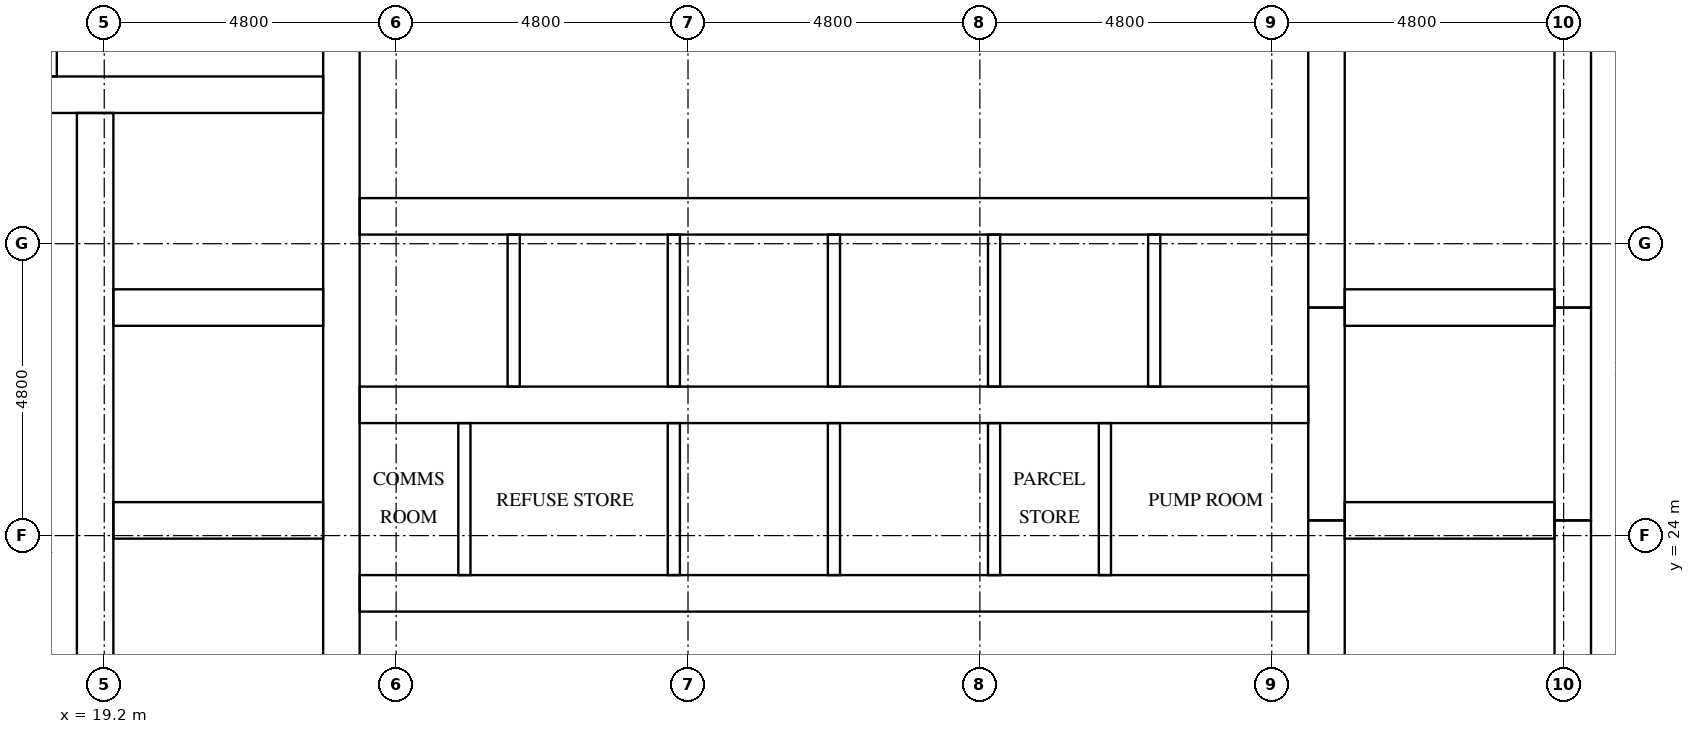
"""IFC4 building model, lengths in metres.
Left out: names, types, materials, properties, quantities, classifications, styles, units other than length and angle.
Written with IfcOpenShell. Run it as: python <this file> out.ifc"""

import sys

from ifc_helpers import new_model, si_unit, direction, frame, frame_2d, origin, place, context, subcontext, project, spatial, rectangle, extrude, element, fill, save


model = new_model("IFC4")
c1 = context("Model", 3, precision=1e-05, world=origin(), true_north=direction((0.0, 1.0)))
c2 = subcontext(c1, "Body", "Model", "MODEL_VIEW")
j1 = project(units=[si_unit("LENGTHUNIT", "METRE"), si_unit("PLANEANGLEUNIT", "RADIAN")], contexts=[c1])
p1 = place(None, origin())
s1 = spatial("IfcSite", under=j1, at=p1, CompositionType="ELEMENT")
p2 = place(p1, origin())
s2 = spatial("IfcBuilding", under=s1, at=p2, CompositionType="ELEMENT")
p3 = place(p2, frame((0.0, 0.0, 156.0)))
s3 = spatial("IfcBuildingStorey", under=s2, at=p3, CompositionType="ELEMENT", Elevation=156.0)
p4 = place(p3, frame((19.05, 15.8, 0.0), z_axis=(0.0, 0.0, 1.0), x_axis=(0.0, 1.0, 0.0)))
e1 = element("IfcWall", 1, at=p4, inside=s3, PredefinedType="SHEAR", context=c2, shape_type="SweptSolid", body=[
    extrude(rectangle(XDim=15.15, YDim=0.6, at=frame_2d((7.575, 0.0))), origin(), (0.0, 0.0, 1.0), 3.2),
])
p5 = place(p4, frame((9.65, 0.0, 0.0)))
e2 = element("IfcOpeningElement", 2, at=p5, cuts=e1, PredefinedType="OPENING", context=c2, shape_type="SweptSolid", body=[
    extrude(rectangle(XDim=1.1, YDim=2.1, at=frame_2d((0.55, 1.05))), frame((0.0, 0.31, 0.0), z_axis=(0.0, -1.0, 0.0), x_axis=(1.0, 0.0, 0.0)), (0.0, 0.0, 1.0), 0.62),
])
p6 = place(p4, frame((13.15, 0.0, 0.0)))
e3 = element("IfcOpeningElement", 3, at=p6, cuts=e1, PredefinedType="OPENING", context=c2, shape_type="SweptSolid", body=[
    extrude(rectangle(XDim=1.1, YDim=2.1, at=frame_2d((0.55, 1.05))), frame((0.0, 0.31, 0.0), z_axis=(0.0, -1.0, 0.0), x_axis=(1.0, 0.0, 0.0)), (0.0, 0.0, 1.0), 0.62),
])
p7 = place(p4, frame((0.4, 0.0, 0.0)))
e4 = element("IfcOpeningElement", 4, at=p7, cuts=e1, PredefinedType="OPENING", context=c2, shape_type="SweptSolid", body=[
    extrude(rectangle(XDim=1.2, YDim=2.1, at=frame_2d((0.6, 1.05))), frame((0.0, 0.31, 0.0), z_axis=(0.0, -1.0, 0.0), x_axis=(1.0, 0.0, 0.0)), (0.0, 0.0, 1.0), 0.62),
])
p8 = place(p3, frame((23.1, 15.8, 0.0), z_axis=(0.0, 0.0, 1.0), x_axis=(0.0, 1.0, 0.0)))
e5 = element("IfcWall", 5, at=p8, inside=s3, PredefinedType="SHEAR", context=c2, shape_type="SweptSolid", body=[
    extrude(rectangle(XDim=21.2, YDim=0.6, at=frame_2d((10.6, 0.0))), origin(), (0.0, 0.0, 1.0), 3.2),
])
p9 = place(p3, frame((39.3, 15.8, 0.0), z_axis=(0.0, 0.0, 1.0), x_axis=(0.0, 1.0, 0.0)))
e6 = element("IfcWall", 6, at=p9, inside=s3, PredefinedType="SHEAR", context=c2, shape_type="SweptSolid", body=[
    extrude(rectangle(XDim=8.45, YDim=0.6, at=frame_2d((4.225, 0.0))), origin(), (0.0, 0.0, 1.0), 3.2),
])
p10 = place(p3, frame((39.3, 24.25, 0.0), z_axis=(0.0, 0.0, 1.0), x_axis=(0.0, 1.0, 0.0)))
e7 = element("IfcWall", 7, at=p10, inside=s3, PredefinedType="SHEAR", context=c2, shape_type="SweptSolid", body=[
    extrude(rectangle(XDim=3.5, YDim=0.6, at=frame_2d((1.75, 0.0))), origin(), (0.0, 0.0, 1.0), 3.2),
])
p11 = place(p3, frame((39.3, 27.75, 0.0), z_axis=(0.0, 0.0, 1.0), x_axis=(0.0, 1.0, 0.0)))
e8 = element("IfcWall", 8, at=p11, inside=s3, PredefinedType="SHEAR", context=c2, shape_type="SweptSolid", body=[
    extrude(rectangle(XDim=9.25, YDim=0.6, at=frame_2d((4.625, 0.0))), origin(), (0.0, 0.0, 1.0), 3.2),
])
p12 = place(p3, frame((43.35, 15.8, 0.0), z_axis=(0.0, 0.0, 1.0), x_axis=(0.0, 1.0, 0.0)))
e9 = element("IfcWall", 9, at=p12, inside=s3, PredefinedType="SHEAR", context=c2, shape_type="SweptSolid", body=[
    extrude(rectangle(XDim=8.45, YDim=0.6, at=frame_2d((4.225, 0.0))), origin(), (0.0, 0.0, 1.0), 3.2),
])
p13 = place(p12, frame((0.4, 0.0, 0.0)))
e10 = element("IfcOpeningElement", 10, at=p13, cuts=e9, PredefinedType="OPENING", context=c2, shape_type="SweptSolid", body=[
    extrude(rectangle(XDim=1.2, YDim=2.1, at=frame_2d((0.6, 1.05))), frame((0.0, 0.31, 0.0), z_axis=(0.0, -1.0, 0.0), x_axis=(1.0, 0.0, 0.0)), (0.0, 0.0, 1.0), 0.62),
])
p14 = place(p3, frame((43.35, 24.25, 0.0), z_axis=(0.0, 0.0, 1.0), x_axis=(0.0, 1.0, 0.0)))
e11 = element("IfcWall", 11, at=p14, inside=s3, PredefinedType="SHEAR", context=c2, shape_type="SweptSolid", body=[
    extrude(rectangle(XDim=3.5, YDim=0.6, at=frame_2d((1.75, 0.0))), origin(), (0.0, 0.0, 1.0), 3.2),
])
p15 = place(p14, frame((1.2, 0.0, 0.0)))
e12 = element("IfcOpeningElement", 12, at=p15, cuts=e11, PredefinedType="OPENING", context=c2, shape_type="SweptSolid", body=[
    extrude(rectangle(XDim=1.1, YDim=2.1, at=frame_2d((0.55, 1.05))), frame((0.0, 0.31, 0.0), z_axis=(0.0, -1.0, 0.0), x_axis=(1.0, 0.0, 0.0)), (0.0, 0.0, 1.0), 0.62),
])
p16 = place(p3, frame((43.35, 27.75, 0.0), z_axis=(0.0, 0.0, 1.0), x_axis=(0.0, 1.0, 0.0)))
e13 = element("IfcWall", 13, at=p16, inside=s3, PredefinedType="SHEAR", context=c2, shape_type="SweptSolid", body=[
    extrude(rectangle(XDim=9.25, YDim=0.6, at=frame_2d((4.625, 0.0))), origin(), (0.0, 0.0, 1.0), 3.2),
])
p17 = place(p16, frame((7.65, 0.0, 0.0)))
e14 = element("IfcOpeningElement", 14, at=p17, cuts=e13, PredefinedType="OPENING", context=c2, shape_type="SweptSolid", body=[
    extrude(rectangle(XDim=1.2, YDim=2.1, at=frame_2d((0.6, 1.05))), frame((0.0, 0.31, 0.0), z_axis=(0.0, -1.0, 0.0), x_axis=(1.0, 0.0, 0.0)), (0.0, 0.0, 1.0), 0.62),
])
for number, where, z_axis, x_axis in (
    (15, (19.35, 24.25, 0.0), (0.0, 0.0, 1.0), (1.0, 0.0, 0.0)),
    (16, (19.35, 27.75, 0.0), (0.0, 0.0, 1.0), (1.0, 0.0, 0.0)),
):
    element("IfcWall", number, at=place(p3, frame(where, z_axis=z_axis, x_axis=x_axis)), inside=s3, PredefinedType="SHEAR", context=c2, shape_type="SweptSolid", body=[
        extrude(rectangle(XDim=3.45, YDim=0.6, at=frame_2d((1.725, 0.0))), origin(), (0.0, 0.0, 1.0), 3.2),
    ])
p18 = place(p3, frame((15.8, 31.25, 0.0), z_axis=(0.0, 0.0, 1.0), x_axis=(1.0, 0.0, 0.0)))
e17 = element("IfcWall", 17, at=p18, inside=s3, PredefinedType="SHEAR", context=c2, shape_type="SweptSolid", body=[
    extrude(rectangle(XDim=7.0, YDim=0.6, at=frame_2d((3.5, 0.0))), origin(), (0.0, 0.0, 1.0), 3.2),
])
for number, where, z_axis, x_axis in (
    (18, (39.6, 24.25, 0.0), (0.0, 0.0, 1.0), (1.0, 0.0, 0.0)),
    (19, (39.6, 27.75, 0.0), (0.0, 0.0, 1.0), (1.0, 0.0, 0.0)),
):
    element("IfcWall", number, at=place(p3, frame(where, z_axis=z_axis, x_axis=x_axis)), inside=s3, PredefinedType="SHEAR", context=c2, shape_type="SweptSolid", body=[
        extrude(rectangle(XDim=3.45, YDim=0.6, at=frame_2d((1.725, 0.0))), origin(), (0.0, 0.0, 1.0), 3.2),
    ])
p19 = place(p3, frame((23.4, 23.05, 0.0), z_axis=(0.0, 0.0, 1.0), x_axis=(1.0, 0.0, 0.0)))
e20 = element("IfcWall", 20, at=p19, inside=s3, PredefinedType="SHEAR", context=c2, shape_type="SweptSolid", body=[
    extrude(rectangle(XDim=15.6, YDim=0.6, at=frame_2d((7.8, 0.0))), origin(), (0.0, 0.0, 1.0), 3.2),
])
p20 = place(p19, frame((0.311, 0.0, 0.0)))
e21 = element("IfcOpeningElement", 21, at=p20, cuts=e20, PredefinedType="OPENING", context=c2, shape_type="SweptSolid", body=[
    extrude(rectangle(XDim=1.0, YDim=2.1, at=frame_2d((0.5, 1.05))), frame((0.0, 0.31, 0.0), z_axis=(0.0, -1.0, 0.0), x_axis=(1.0, 0.0, 0.0)), (0.0, 0.0, 1.0), 0.62),
])
p21 = place(p19, frame((2.945, 0.0, 0.0)))
e22 = element("IfcOpeningElement", 22, at=p21, cuts=e20, PredefinedType="OPENING", context=c2, shape_type="SweptSolid", body=[
    extrude(rectangle(XDim=1.0, YDim=2.1, at=frame_2d((0.5, 1.05))), frame((0.0, 0.31, 0.0), z_axis=(0.0, -1.0, 0.0), x_axis=(1.0, 0.0, 0.0)), (0.0, 0.0, 1.0), 0.62),
])
p22 = place(p19, frame((10.845, 0.0, 0.0)))
e23 = element("IfcOpeningElement", 23, at=p22, cuts=e20, PredefinedType="OPENING", context=c2, shape_type="SweptSolid", body=[
    extrude(rectangle(XDim=1.0, YDim=2.1, at=frame_2d((0.5, 1.05))), frame((0.0, 0.31, 0.0), z_axis=(0.0, -1.0, 0.0), x_axis=(1.0, 0.0, 0.0)), (0.0, 0.0, 1.0), 0.62),
])
p23 = place(p19, frame((13.478, 0.0, 0.0)))
e24 = element("IfcOpeningElement", 24, at=p23, cuts=e20, PredefinedType="OPENING", context=c2, shape_type="SweptSolid", body=[
    extrude(rectangle(XDim=1.0, YDim=2.1, at=frame_2d((0.5, 1.05))), frame((0.0, 0.31, 0.0), z_axis=(0.0, -1.0, 0.0), x_axis=(1.0, 0.0, 0.0)), (0.0, 0.0, 1.0), 0.62),
])
p24 = place(p3, frame((23.4, 26.15, 0.0), z_axis=(0.0, 0.0, 1.0), x_axis=(1.0, 0.0, 0.0)))
e25 = element("IfcWall", 25, at=p24, inside=s3, PredefinedType="SHEAR", context=c2, shape_type="SweptSolid", body=[
    extrude(rectangle(XDim=15.6, YDim=0.6, at=frame_2d((7.8, 0.0))), origin(), (0.0, 0.0, 1.0), 3.2),
])
p25 = place(p3, frame((23.4, 29.25, 0.0), z_axis=(0.0, 0.0, 1.0), x_axis=(1.0, 0.0, 0.0)))
e26 = element("IfcWall", 26, at=p25, inside=s3, PredefinedType="SHEAR", context=c2, shape_type="SweptSolid", body=[
    extrude(rectangle(XDim=15.6, YDim=0.6, at=frame_2d((7.8, 0.0))), origin(), (0.0, 0.0, 1.0), 3.2),
])
p26 = place(p25, frame((0.667, 0.0, 0.0)))
e27 = element("IfcOpeningElement", 27, at=p26, cuts=e26, PredefinedType="OPENING", context=c2, shape_type="SweptSolid", body=[
    extrude(rectangle(XDim=1.1, YDim=2.1, at=frame_2d((0.55, 1.05))), frame((0.0, 0.31, 0.0), z_axis=(0.0, -1.0, 0.0), x_axis=(1.0, 0.0, 0.0)), (0.0, 0.0, 1.0), 0.62),
])
p27 = place(p25, frame((3.3, 0.0, 0.0)))
e28 = element("IfcOpeningElement", 28, at=p27, cuts=e26, PredefinedType="OPENING", context=c2, shape_type="SweptSolid", body=[
    extrude(rectangle(XDim=1.1, YDim=2.1, at=frame_2d((0.55, 1.05))), frame((0.0, 0.31, 0.0), z_axis=(0.0, -1.0, 0.0), x_axis=(1.0, 0.0, 0.0)), (0.0, 0.0, 1.0), 0.62),
])
p28 = place(p25, frame((5.933, 0.0, 0.0)))
e29 = element("IfcOpeningElement", 29, at=p28, cuts=e26, PredefinedType="OPENING", context=c2, shape_type="SweptSolid", body=[
    extrude(rectangle(XDim=1.1, YDim=2.1, at=frame_2d((0.55, 1.05))), frame((0.0, 0.31, 0.0), z_axis=(0.0, -1.0, 0.0), x_axis=(1.0, 0.0, 0.0)), (0.0, 0.0, 1.0), 0.62),
])
p29 = place(p25, frame((8.567, 0.0, 0.0)))
e30 = element("IfcOpeningElement", 30, at=p29, cuts=e26, PredefinedType="OPENING", context=c2, shape_type="SweptSolid", body=[
    extrude(rectangle(XDim=1.1, YDim=2.1, at=frame_2d((0.55, 1.05))), frame((0.0, 0.31, 0.0), z_axis=(0.0, -1.0, 0.0), x_axis=(1.0, 0.0, 0.0)), (0.0, 0.0, 1.0), 0.62),
])
p30 = place(p25, frame((11.2, 0.0, 0.0)))
e31 = element("IfcOpeningElement", 31, at=p30, cuts=e26, PredefinedType="OPENING", context=c2, shape_type="SweptSolid", body=[
    extrude(rectangle(XDim=1.1, YDim=2.1, at=frame_2d((0.55, 1.05))), frame((0.0, 0.31, 0.0), z_axis=(0.0, -1.0, 0.0), x_axis=(1.0, 0.0, 0.0)), (0.0, 0.0, 1.0), 0.62),
])
p31 = place(p25, frame((13.833, 0.0, 0.0)))
e32 = element("IfcOpeningElement", 32, at=p31, cuts=e26, PredefinedType="OPENING", context=c2, shape_type="SweptSolid", body=[
    extrude(rectangle(XDim=1.1, YDim=2.1, at=frame_2d((0.55, 1.05))), frame((0.0, 0.31, 0.0), z_axis=(0.0, -1.0, 0.0), x_axis=(1.0, 0.0, 0.0)), (0.0, 0.0, 1.0), 0.62),
])
for number, where, z_axis, x_axis in (
    (33, (25.933, 26.45, 0.0), (0.0, 0.0, 1.0), (0.0, 1.0, 0.0)),
    (34, (28.567, 23.35, 0.0), (0.0, 0.0, 1.0), (0.0, 1.0, 0.0)),
    (35, (28.567, 26.45, 0.0), (0.0, 0.0, 1.0), (0.0, 1.0, 0.0)),
    (36, (31.2, 23.35, 0.0), (0.0, 0.0, 1.0), (0.0, 1.0, 0.0)),
    (37, (31.2, 26.45, 0.0), (0.0, 0.0, 1.0), (0.0, 1.0, 0.0)),
    (38, (33.833, 23.35, 0.0), (0.0, 0.0, 1.0), (0.0, 1.0, 0.0)),
    (39, (33.833, 26.45, 0.0), (0.0, 0.0, 1.0), (0.0, 1.0, 0.0)),
    (40, (36.467, 26.45, 0.0), (0.0, 0.0, 1.0), (0.0, 1.0, 0.0)),
):
    element("IfcWall", number, at=place(p3, frame(where, z_axis=z_axis, x_axis=x_axis)), inside=s3, PredefinedType="SOLIDWALL", context=c2, shape_type="SweptSolid", body=[
        extrude(rectangle(XDim=2.5, YDim=0.2, at=frame_2d((1.25, 0.0))), origin(), (0.0, 0.0, 1.0), 3.2),
    ])
p32 = place(p3, frame((18.32, 31.55, 0.0), z_axis=(0.0, 0.0, 1.0), x_axis=(0.0, 1.0, 0.0)))
e41 = element("IfcWall", 41, at=p32, inside=s3, PredefinedType="PARTITIONING", context=c2, shape_type="SweptSolid", body=[
    extrude(rectangle(XDim=5.45, YDim=0.2, at=frame_2d((2.725, 0.0))), origin(), (0.0, 0.0, 1.0), 3.2),
])
for number, where, z_axis, x_axis in (
    (42, (25.123, 23.35, 0.0), (0.0, 0.0, 1.0), (0.0, 1.0, 0.0)),
    (43, (35.656, 23.35, 0.0), (0.0, 0.0, 1.0), (0.0, 1.0, 0.0)),
):
    element("IfcWall", number, at=place(p3, frame(where, z_axis=z_axis, x_axis=x_axis)), inside=s3, PredefinedType="PARTITIONING", context=c2, shape_type="SweptSolid", body=[
        extrude(rectangle(XDim=2.5, YDim=0.2, at=frame_2d((1.25, 0.0))), origin(), (0.0, 0.0, 1.0), 3.2),
    ])
p33 = place(p26, origin())
e44 = element("IfcDoor", 44, at=p33, inside=s3, OperationType="DOUBLE_DOOR_SLIDING", PredefinedType="DOOR", context=c2, shape_type="SweptSolid", body=[
    extrude(rectangle(XDim=1.1, YDim=2.1, at=frame_2d((0.55, 1.05))), frame((0.0, 0.025, 0.0), z_axis=(0.0, -1.0, 0.0), x_axis=(1.0, 0.0, 0.0)), (0.0, 0.0, 1.0), 0.05),
])
fill(e27, e44)
p34 = place(p27, origin())
e45 = element("IfcDoor", 45, at=p34, inside=s3, OperationType="DOUBLE_DOOR_SLIDING", PredefinedType="DOOR", context=c2, shape_type="SweptSolid", body=[
    extrude(rectangle(XDim=1.1, YDim=2.1, at=frame_2d((0.55, 1.05))), frame((0.0, 0.025, 0.0), z_axis=(0.0, -1.0, 0.0), x_axis=(1.0, 0.0, 0.0)), (0.0, 0.0, 1.0), 0.05),
])
fill(e28, e45)
p35 = place(p28, origin())
e46 = element("IfcDoor", 46, at=p35, inside=s3, OperationType="DOUBLE_DOOR_SLIDING", PredefinedType="DOOR", context=c2, shape_type="SweptSolid", body=[
    extrude(rectangle(XDim=1.1, YDim=2.1, at=frame_2d((0.55, 1.05))), frame((0.0, 0.025, 0.0), z_axis=(0.0, -1.0, 0.0), x_axis=(1.0, 0.0, 0.0)), (0.0, 0.0, 1.0), 0.05),
])
fill(e29, e46)
p36 = place(p29, origin())
e47 = element("IfcDoor", 47, at=p36, inside=s3, OperationType="DOUBLE_DOOR_SLIDING", PredefinedType="DOOR", context=c2, shape_type="SweptSolid", body=[
    extrude(rectangle(XDim=1.1, YDim=2.1, at=frame_2d((0.55, 1.05))), frame((0.0, 0.025, 0.0), z_axis=(0.0, -1.0, 0.0), x_axis=(1.0, 0.0, 0.0)), (0.0, 0.0, 1.0), 0.05),
])
fill(e30, e47)
p37 = place(p30, origin())
e48 = element("IfcDoor", 48, at=p37, inside=s3, OperationType="DOUBLE_DOOR_SLIDING", PredefinedType="DOOR", context=c2, shape_type="SweptSolid", body=[
    extrude(rectangle(XDim=1.1, YDim=2.1, at=frame_2d((0.55, 1.05))), frame((0.0, 0.025, 0.0), z_axis=(0.0, -1.0, 0.0), x_axis=(1.0, 0.0, 0.0)), (0.0, 0.0, 1.0), 0.05),
])
fill(e31, e48)
p38 = place(p31, origin())
e49 = element("IfcDoor", 49, at=p38, inside=s3, OperationType="DOUBLE_DOOR_SLIDING", PredefinedType="DOOR", context=c2, shape_type="SweptSolid", body=[
    extrude(rectangle(XDim=1.1, YDim=2.1, at=frame_2d((0.55, 1.05))), frame((0.0, 0.025, 0.0), z_axis=(0.0, -1.0, 0.0), x_axis=(1.0, 0.0, 0.0)), (0.0, 0.0, 1.0), 0.05),
])
fill(e32, e49)
p39 = place(p5, origin())
e50 = element("IfcDoor", 50, at=p39, inside=s3, OperationType="DOUBLE_DOOR_SLIDING", PredefinedType="DOOR", context=c2, shape_type="SweptSolid", body=[
    extrude(rectangle(XDim=1.1, YDim=2.1, at=frame_2d((0.55, 1.05))), frame((0.0, 0.025, 0.0), z_axis=(0.0, -1.0, 0.0), x_axis=(1.0, 0.0, 0.0)), (0.0, 0.0, 1.0), 0.05),
])
fill(e2, e50)
p40 = place(p6, origin())
e51 = element("IfcDoor", 51, at=p40, inside=s3, OperationType="DOUBLE_DOOR_SLIDING", PredefinedType="DOOR", context=c2, shape_type="SweptSolid", body=[
    extrude(rectangle(XDim=1.1, YDim=2.1, at=frame_2d((0.55, 1.05))), frame((0.0, 0.025, 0.0), z_axis=(0.0, -1.0, 0.0), x_axis=(1.0, 0.0, 0.0)), (0.0, 0.0, 1.0), 0.05),
])
fill(e3, e51)
p41 = place(p15, origin())
e52 = element("IfcDoor", 52, at=p41, inside=s3, OperationType="DOUBLE_DOOR_SLIDING", PredefinedType="DOOR", context=c2, shape_type="SweptSolid", body=[
    extrude(rectangle(XDim=1.1, YDim=2.1, at=frame_2d((0.55, 1.05))), frame((0.0, 0.025, 0.0), z_axis=(0.0, -1.0, 0.0), x_axis=(1.0, 0.0, 0.0)), (0.0, 0.0, 1.0), 0.05),
])
fill(e12, e52)
p42 = place(p20, frame((1.0, 0.0, 0.0), z_axis=(0.0, 0.0, 1.0), x_axis=(-1.0, 0.0, 0.0)))
e53 = element("IfcDoor", 53, at=p42, inside=s3, OperationType="SINGLE_SWING_LEFT", PredefinedType="DOOR", context=c2, shape_type="SweptSolid", body=[
    extrude(rectangle(XDim=1.0, YDim=2.1, at=frame_2d((0.5, 1.05))), frame((0.0, 0.025, 0.0), z_axis=(0.0, -1.0, 0.0), x_axis=(1.0, 0.0, 0.0)), (0.0, 0.0, 1.0), 0.05),
])
fill(e21, e53)
p43 = place(p21, frame((1.0, 0.0, 0.0), z_axis=(0.0, 0.0, 1.0), x_axis=(-1.0, 0.0, 0.0)))
e54 = element("IfcDoor", 54, at=p43, inside=s3, OperationType="SINGLE_SWING_RIGHT", PredefinedType="DOOR", context=c2, shape_type="SweptSolid", body=[
    extrude(rectangle(XDim=1.0, YDim=2.1, at=frame_2d((0.5, 1.05))), frame((0.0, 0.025, 0.0), z_axis=(0.0, -1.0, 0.0), x_axis=(1.0, 0.0, 0.0)), (0.0, 0.0, 1.0), 0.05),
])
fill(e22, e54)
p44 = place(p22, frame((1.0, 0.0, 0.0), z_axis=(0.0, 0.0, 1.0), x_axis=(-1.0, 0.0, 0.0)))
e55 = element("IfcDoor", 55, at=p44, inside=s3, OperationType="SINGLE_SWING_LEFT", PredefinedType="DOOR", context=c2, shape_type="SweptSolid", body=[
    extrude(rectangle(XDim=1.0, YDim=2.1, at=frame_2d((0.5, 1.05))), frame((0.0, 0.025, 0.0), z_axis=(0.0, -1.0, 0.0), x_axis=(1.0, 0.0, 0.0)), (0.0, 0.0, 1.0), 0.05),
])
fill(e23, e55)
p45 = place(p23, frame((1.0, 0.0, 0.0), z_axis=(0.0, 0.0, 1.0), x_axis=(-1.0, 0.0, 0.0)))
e56 = element("IfcDoor", 56, at=p45, inside=s3, OperationType="SINGLE_SWING_RIGHT", PredefinedType="DOOR", context=c2, shape_type="SweptSolid", body=[
    extrude(rectangle(XDim=1.0, YDim=2.1, at=frame_2d((0.5, 1.05))), frame((0.0, 0.025, 0.0), z_axis=(0.0, -1.0, 0.0), x_axis=(1.0, 0.0, 0.0)), (0.0, 0.0, 1.0), 0.05),
])
fill(e24, e56)
save(model, sys.argv[1])
